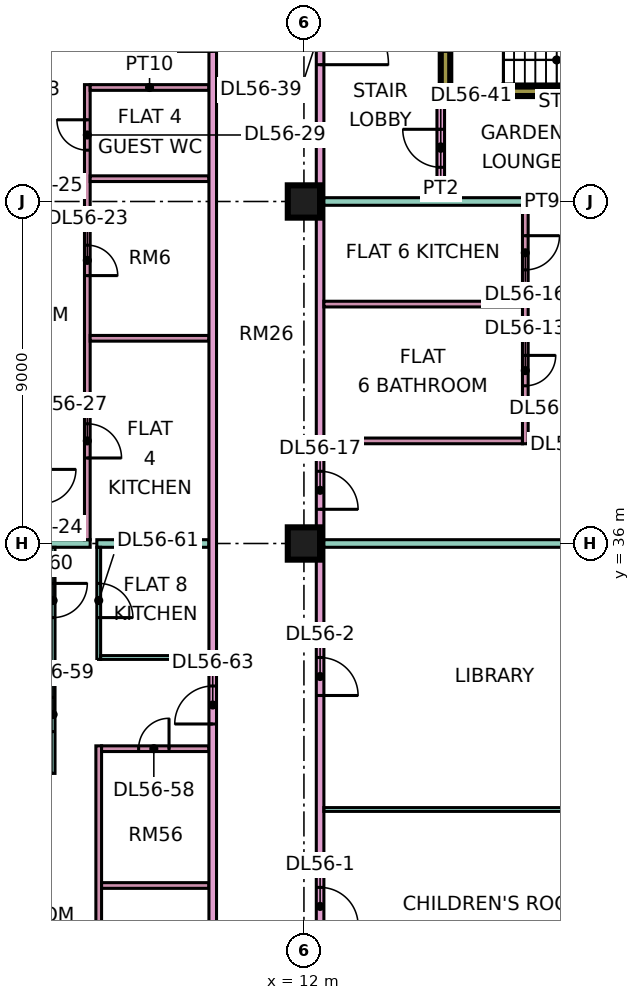
"""IFC4 building model, lengths in metres.
Left out: names, types, materials, properties, quantities, classifications, styles, units other than length and angle.
Written with IfcOpenShell. Run it as: python <this file> out.ifc"""

import sys

from ifc_helpers import new_model, si_unit, direction, frame, frame_2d, origin, origin_2d, place, context, subcontext, project, spatial, rectangle, extrude, element, fill, save


model = new_model("IFC4")
c1 = context("Model", 3, precision=1e-05, world=origin(), true_north=direction((0.0, 1.0)))
c2 = subcontext(c1, "Body", "Model", "MODEL_VIEW")
j1 = project(units=[si_unit("LENGTHUNIT", "METRE"), si_unit("PLANEANGLEUNIT", "RADIAN")], contexts=[c1])
p1 = place(None, origin())
s1 = spatial("IfcSite", under=j1, at=p1, CompositionType="ELEMENT")
p2 = place(p1, origin())
s2 = spatial("IfcBuilding", under=s1, at=p2, CompositionType="ELEMENT")
p3 = place(p2, frame((0.0, 0.0, 237.9)))
s3 = spatial("IfcBuildingStorey", under=s2, at=p3, CompositionType="ELEMENT", Elevation=237.9)
for number, where, z_axis, x_axis in (
    (1, (12.0, 36.0, 0.0), (0.0, 0.0, 1.0), (1.0, 0.0, 0.0)),
    (2, (12.0, 45.0, 0.0), (0.0, 0.0, 1.0), (1.0, 0.0, 0.0)),
):
    element("IfcColumn", number, at=place(p3, frame(where, z_axis=z_axis, x_axis=x_axis)), inside=s3, PredefinedType="COLUMN", context=c2, shape_type="SweptSolid", body=[
        extrude(rectangle(XDim=0.85, YDim=0.85, at=origin_2d()), origin(), (0.0, 0.0, 1.0), 3.75),
    ])
p4 = place(p3, frame((15.6, 47.9, 0.0), z_axis=(0.0, 0.0, 1.0), x_axis=(1.0, 0.0, 0.0)))
e3 = element("IfcWall", 3, at=p4, inside=s3, PredefinedType="SHEAR", context=c2, shape_type="SweptSolid", body=[
    extrude(rectangle(XDim=7.0, YDim=0.25, at=frame_2d((3.5, 0.0))), origin(), (0.0, 0.0, 1.0), 3.75),
])
p5 = place(p3, frame((15.725, 48.025, 0.0), z_axis=(0.0, 0.0, 1.0), x_axis=(0.0, 1.0, 0.0)))
e4 = element("IfcWall", 4, at=p5, inside=s3, PredefinedType="SHEAR", context=c2, shape_type="SweptSolid", body=[
    extrude(rectangle(XDim=2.95, YDim=0.25, at=frame_2d((1.475, 0.0))), origin(), (0.0, 0.0, 1.0), 3.75),
])
p6 = place(p5, frame((0.925, 0.0, 0.0)))
e5 = element("IfcOpeningElement", 5, at=p6, cuts=e4, PredefinedType="OPENING", context=c2, shape_type="SweptSolid", body=[
    extrude(rectangle(XDim=1.1, YDim=2.2, at=frame_2d((0.55, 1.1))), frame((0.0, 0.135, 0.0), z_axis=(0.0, -1.0, 0.0), x_axis=(1.0, 0.0, 0.0)), (0.0, 0.0, 1.0), 0.27),
])
p7 = place(p3, frame((0.0, 36.0, 0.0), z_axis=(0.0, 0.0, 1.0), x_axis=(1.0, 0.0, 0.0)))
e6 = element("IfcWall", 6, at=p7, inside=s3, PredefinedType="PARTITIONING", context=c2, shape_type="SweptSolid", body=[
    extrude(rectangle(XDim=6.375, YDim=0.2, at=frame_2d((3.188, 0.0))), origin(), (0.0, 0.0, 1.0), 3.35),
])
p8 = place(p3, frame((5.4, 29.95, 0.0), z_axis=(0.0, 0.0, 1.0), x_axis=(0.0, 1.0, 0.0)))
e7 = element("IfcWall", 7, at=p8, inside=s3, PredefinedType="PARTITIONING", context=c2, shape_type="SweptSolid", body=[
    extrude(rectangle(XDim=5.95, YDim=0.1, at=frame_2d((2.975, 0.0))), origin(), (0.0, 0.0, 1.0), 3.35),
])
p9 = place(p8, frame((1.1, 0.0, 0.0)))
e8 = element("IfcOpeningElement", 8, at=p9, cuts=e7, PredefinedType="OPENING", context=c2, shape_type="SweptSolid", body=[
    extrude(rectangle(XDim=0.9, YDim=2.1, at=frame_2d((0.45, 1.05))), frame((0.0, 0.06, 0.0), z_axis=(0.0, -1.0, 0.0), x_axis=(1.0, 0.0, 0.0)), (0.0, 0.0, 1.0), 0.12),
])
p10 = place(p8, frame((4.1, 0.0, 0.0)))
e9 = element("IfcOpeningElement", 9, at=p10, cuts=e7, PredefinedType="OPENING", context=c2, shape_type="SweptSolid", body=[
    extrude(rectangle(XDim=0.9, YDim=2.1, at=frame_2d((0.45, 1.05))), frame((0.0, 0.06, 0.0), z_axis=(0.0, -1.0, 0.0), x_axis=(1.0, 0.0, 0.0)), (0.0, 0.0, 1.0), 0.12),
])
p11 = place(p3, frame((6.3, 36.1, 0.0), z_axis=(0.0, 0.0, 1.0), x_axis=(0.0, 1.0, 0.0)))
e10 = element("IfcWall", 10, at=p11, inside=s3, PredefinedType="PARTITIONING", context=c2, shape_type="SweptSolid", body=[
    extrude(rectangle(XDim=11.975, YDim=0.15, at=frame_2d((5.987, 0.0))), origin(), (0.0, 0.0, 1.0), 3.35),
])
p12 = place(p11, frame((6.95, 0.0, 0.0)))
e11 = element("IfcOpeningElement", 11, at=p12, cuts=e10, PredefinedType="OPENING", context=c2, shape_type="SweptSolid", body=[
    extrude(rectangle(XDim=0.8, YDim=2.1, at=frame_2d((0.4, 1.05))), frame((0.0, 0.085, 0.0), z_axis=(0.0, -1.0, 0.0), x_axis=(1.0, 0.0, 0.0)), (0.0, 0.0, 1.0), 0.17),
])
p13 = place(p11, frame((2.15, 0.0, 0.0)))
e12 = element("IfcOpeningElement", 12, at=p13, cuts=e10, PredefinedType="OPENING", context=c2, shape_type="SweptSolid", body=[
    extrude(rectangle(XDim=0.9, YDim=2.1, at=frame_2d((0.45, 1.05))), frame((0.0, 0.085, 0.0), z_axis=(0.0, -1.0, 0.0), x_axis=(1.0, 0.0, 0.0)), (0.0, 0.0, 1.0), 0.17),
])
p14 = place(p11, frame((10.25, 0.0, 0.0)))
e13 = element("IfcOpeningElement", 13, at=p14, cuts=e10, PredefinedType="OPENING", context=c2, shape_type="SweptSolid", body=[
    extrude(rectangle(XDim=0.8, YDim=2.1, at=frame_2d((0.4, 1.05))), frame((0.0, 0.085, 0.0), z_axis=(0.0, -1.0, 0.0), x_axis=(1.0, 0.0, 0.0)), (0.0, 0.0, 1.0), 0.17),
])
for number, where, z_axis, x_axis in (
    (14, (6.375, 41.4, 0.0), (0.0, 0.0, 1.0), (1.0, 0.0, 0.0)),
    (15, (6.375, 45.6, 0.0), (0.0, 0.0, 1.0), (1.0, 0.0, 0.0)),
    (16, (6.375, 48.0, 0.0), (0.0, 0.0, 1.0), (1.0, 0.0, 0.0)),
):
    element("IfcWall", number, at=place(p3, frame(where, z_axis=z_axis, x_axis=x_axis)), inside=s3, PredefinedType="PARTITIONING", context=c2, shape_type="SweptSolid", body=[
        extrude(rectangle(XDim=3.125, YDim=0.15, at=frame_2d((1.562, 0.0))), origin(), (0.0, 0.0, 1.0), 3.35),
    ])
p15 = place(p3, frame((6.55, 36.0, 0.0), z_axis=(0.0, 0.0, 1.0), x_axis=(1.0, 0.0, 0.0)))
e17 = element("IfcWall", 17, at=p15, inside=s3, PredefinedType="PARTITIONING", context=c2, shape_type="SweptSolid", body=[
    extrude(rectangle(XDim=2.95, YDim=0.2, at=frame_2d((1.475, 0.0))), origin(), (0.0, 0.0, 1.0), 3.35),
])
p16 = place(p3, frame((6.6, 22.5, 0.0), z_axis=(0.0, 0.0, 1.0), x_axis=(0.0, 1.0, 0.0)))
e18 = element("IfcWall", 18, at=p16, inside=s3, PredefinedType="PARTITIONING", context=c2, shape_type="SweptSolid", body=[
    extrude(rectangle(XDim=8.175, YDim=0.15, at=frame_2d((4.087, 0.0))), origin(), (0.0, 0.0, 1.0), 3.35),
])
p17 = place(p16, frame((1.85, 0.0, 0.0)))
e19 = element("IfcOpeningElement", 19, at=p17, cuts=e18, PredefinedType="OPENING", context=c2, shape_type="SweptSolid", body=[
    extrude(rectangle(XDim=0.8, YDim=2.1, at=frame_2d((0.4, 1.05))), frame((0.0, 0.085, 0.0), z_axis=(0.0, -1.0, 0.0), x_axis=(1.0, 0.0, 0.0)), (0.0, 0.0, 1.0), 0.17),
])
p18 = place(p3, frame((6.6, 32.95, 0.0), z_axis=(0.0, 0.0, 1.0), x_axis=(0.0, 1.0, 0.0)))
e20 = element("IfcWall", 20, at=p18, inside=s3, PredefinedType="PARTITIONING", context=c2, shape_type="SweptSolid", body=[
    extrude(rectangle(XDim=2.95, YDim=0.1, at=frame_2d((1.475, 0.0))), origin(), (0.0, 0.0, 1.0), 3.35),
])
p19 = place(p18, frame((1.1, 0.0, 0.0)))
e21 = element("IfcOpeningElement", 21, at=p19, cuts=e20, PredefinedType="OPENING", context=c2, shape_type="SweptSolid", body=[
    extrude(rectangle(XDim=0.9, YDim=2.1, at=frame_2d((0.45, 1.05))), frame((0.0, 0.06, 0.0), z_axis=(0.0, -1.0, 0.0), x_axis=(1.0, 0.0, 0.0)), (0.0, 0.0, 1.0), 0.12),
])
p20 = place(p3, frame((6.65, 33.0, 0.0), z_axis=(0.0, 0.0, 1.0), x_axis=(1.0, 0.0, 0.0)))
e22 = element("IfcWall", 22, at=p20, inside=s3, PredefinedType="PARTITIONING", context=c2, shape_type="SweptSolid", body=[
    extrude(rectangle(XDim=2.85, YDim=0.1, at=frame_2d((1.425, 0.0))), origin(), (0.0, 0.0, 1.0), 3.35),
])
p21 = place(p3, frame((6.675, 27.0, 0.0), z_axis=(0.0, 0.0, 1.0), x_axis=(1.0, 0.0, 0.0)))
e23 = element("IfcWall", 23, at=p21, inside=s3, PredefinedType="PARTITIONING", context=c2, shape_type="SweptSolid", body=[
    extrude(rectangle(XDim=2.825, YDim=0.15, at=frame_2d((1.413, 0.0))), origin(), (0.0, 0.0, 1.0), 3.35),
])
p22 = place(p3, frame((6.675, 30.6, 0.0), z_axis=(0.0, 0.0, 1.0), x_axis=(1.0, 0.0, 0.0)))
e24 = element("IfcWall", 24, at=p22, inside=s3, PredefinedType="PARTITIONING", context=c2, shape_type="SweptSolid", body=[
    extrude(rectangle(XDim=2.825, YDim=0.15, at=frame_2d((1.413, 0.0))), origin(), (0.0, 0.0, 1.0), 3.35),
])
p23 = place(p22, frame((0.975, 0.0, 0.0)))
e25 = element("IfcOpeningElement", 25, at=p23, cuts=e24, PredefinedType="OPENING", context=c2, shape_type="SweptSolid", body=[
    extrude(rectangle(XDim=0.8, YDim=2.1, at=frame_2d((0.4, 1.05))), frame((0.0, 0.085, 0.0), z_axis=(0.0, -1.0, 0.0), x_axis=(1.0, 0.0, 0.0)), (0.0, 0.0, 1.0), 0.17),
])
p24 = place(p3, frame((9.6, 20.0, 0.0), z_axis=(0.0, 0.0, 1.0), x_axis=(0.0, 1.0, 0.0)))
e26 = element("IfcWall", 26, at=p24, inside=s3, PredefinedType="PARTITIONING", context=c2, shape_type="SweptSolid", body=[
    extrude(rectangle(XDim=42.926, YDim=0.2, at=frame_2d((21.463, 0.0))), origin(), (0.0, 0.0, 1.0), 3.35),
])
p25 = place(p24, frame((28.95, 0.0, 0.0)))
e27 = element("IfcOpeningElement", 27, at=p25, cuts=e26, PredefinedType="OPENING", context=c2, shape_type="SweptSolid", body=[
    extrude(rectangle(XDim=1.0, YDim=2.1, at=frame_2d((0.5, 1.05))), frame((0.0, 0.11, 0.0), z_axis=(0.0, -1.0, 0.0), x_axis=(1.0, 0.0, 0.0)), (0.0, 0.0, 1.0), 0.22),
])
p26 = place(p24, frame((31.95, 0.0, 0.0)))
e28 = element("IfcOpeningElement", 28, at=p26, cuts=e26, PredefinedType="OPENING", context=c2, shape_type="SweptSolid", body=[
    extrude(rectangle(XDim=1.0, YDim=2.1, at=frame_2d((0.5, 1.05))), frame((0.0, 0.11, 0.0), z_axis=(0.0, -1.0, 0.0), x_axis=(1.0, 0.0, 0.0)), (0.0, 0.0, 1.0), 0.22),
])
p27 = place(p24, frame((0.6, 0.0, 0.0)))
e29 = element("IfcOpeningElement", 29, at=p27, cuts=e26, PredefinedType="OPENING", context=c2, shape_type="SweptSolid", body=[
    extrude(rectangle(XDim=1.2, YDim=2.1, at=frame_2d((0.6, 1.05))), frame((0.0, 0.11, 0.0), z_axis=(0.0, -1.0, 0.0), x_axis=(1.0, 0.0, 0.0)), (0.0, 0.0, 1.0), 0.22),
])
p28 = place(p24, frame((11.25, 0.0, 0.0)))
e30 = element("IfcOpeningElement", 30, at=p28, cuts=e26, PredefinedType="OPENING", context=c2, shape_type="SweptSolid", body=[
    extrude(rectangle(XDim=1.0, YDim=2.1, at=frame_2d((0.5, 1.05))), frame((0.0, 0.11, 0.0), z_axis=(0.0, -1.0, 0.0), x_axis=(1.0, 0.0, 0.0)), (0.0, 0.0, 1.0), 0.22),
])
p29 = place(p3, frame((12.425, 20.0, 0.0), z_axis=(0.0, 0.0, 1.0), x_axis=(0.0, 1.0, 0.0)))
e31 = element("IfcWall", 31, at=p29, inside=s3, PredefinedType="PARTITIONING", context=c2, shape_type="SweptSolid", body=[
    extrude(rectangle(XDim=43.0, YDim=0.2, at=frame_2d((21.5, 0.0))), origin(), (0.0, 0.0, 1.0), 3.35),
])
p30 = place(p29, frame((5.95, 0.0, 0.0)))
e32 = element("IfcOpeningElement", 32, at=p30, cuts=e31, PredefinedType="OPENING", context=c2, shape_type="SweptSolid", body=[
    extrude(rectangle(XDim=1.0, YDim=2.1, at=frame_2d((0.5, 1.05))), frame((0.0, 0.11, 0.0), z_axis=(0.0, -1.0, 0.0), x_axis=(1.0, 0.0, 0.0)), (0.0, 0.0, 1.0), 0.22),
])
p31 = place(p29, frame((12.0, 0.0, 0.0)))
e33 = element("IfcOpeningElement", 33, at=p31, cuts=e31, PredefinedType="OPENING", context=c2, shape_type="SweptSolid", body=[
    extrude(rectangle(XDim=1.0, YDim=2.1, at=frame_2d((0.5, 1.05))), frame((0.0, 0.11, 0.0), z_axis=(0.0, -1.0, 0.0), x_axis=(1.0, 0.0, 0.0)), (0.0, 0.0, 1.0), 0.22),
])
p32 = place(p29, frame((16.9, 0.0, 0.0)))
e34 = element("IfcOpeningElement", 34, at=p32, cuts=e31, PredefinedType="OPENING", context=c2, shape_type="SweptSolid", body=[
    extrude(rectangle(XDim=1.0, YDim=2.1, at=frame_2d((0.5, 1.05))), frame((0.0, 0.11, 0.0), z_axis=(0.0, -1.0, 0.0), x_axis=(1.0, 0.0, 0.0)), (0.0, 0.0, 1.0), 0.22),
])
p33 = place(p29, frame((41.05, 0.0, 0.0)))
e35 = element("IfcOpeningElement", 35, at=p33, cuts=e31, PredefinedType="OPENING", context=c2, shape_type="SweptSolid", body=[
    extrude(rectangle(XDim=1.0, YDim=2.1, at=frame_2d((0.5, 1.05))), frame((0.0, 0.11, 0.0), z_axis=(0.0, -1.0, 0.0), x_axis=(1.0, 0.0, 0.0)), (0.0, 0.0, 1.0), 0.22),
])
p34 = place(p29, frame((1.15, 0.0, 0.0)))
e36 = element("IfcOpeningElement", 36, at=p34, cuts=e31, PredefinedType="OPENING", context=c2, shape_type="SweptSolid", body=[
    extrude(rectangle(XDim=1.8, YDim=2.1, at=frame_2d((0.9, 1.05))), frame((0.0, 0.11, 0.0), z_axis=(0.0, -1.0, 0.0), x_axis=(1.0, 0.0, 0.0)), (0.0, 0.0, 1.0), 0.22),
])
p35 = place(p29, frame((28.6, 0.0, 0.0)))
e37 = element("IfcOpeningElement", 37, at=p35, cuts=e31, PredefinedType="OPENING", context=c2, shape_type="SweptSolid", body=[
    extrude(rectangle(XDim=1.8, YDim=2.1, at=frame_2d((0.9, 1.05))), frame((0.0, 0.11, 0.0), z_axis=(0.0, -1.0, 0.0), x_axis=(1.0, 0.0, 0.0)), (0.0, 0.0, 1.0), 0.22),
])
p36 = place(p3, frame((12.525, 29.0, 0.0), z_axis=(0.0, 0.0, 1.0), x_axis=(1.0, 0.0, 0.0)))
e38 = element("IfcWall", 38, at=p36, inside=s3, PredefinedType="PARTITIONING", context=c2, shape_type="SweptSolid", body=[
    extrude(rectangle(XDim=8.975, YDim=0.1, at=frame_2d((4.488, 0.0))), origin(), (0.0, 0.0, 1.0), 3.35),
])
p37 = place(p3, frame((12.525, 36.0, 0.0), z_axis=(0.0, 0.0, 1.0), x_axis=(1.0, 0.0, 0.0)))
e39 = element("IfcWall", 39, at=p37, inside=s3, PredefinedType="PARTITIONING", context=c2, shape_type="SweptSolid", body=[
    extrude(rectangle(XDim=11.475, YDim=0.2, at=frame_2d((5.738, 0.0))), origin(), (0.0, 0.0, 1.0), 3.35),
])
for number, where, z_axis, x_axis in (
    (40, (12.525, 38.7, 0.0), (0.0, 0.0, 1.0), (1.0, 0.0, 0.0)),
    (41, (12.525, 42.3, 0.0), (0.0, 0.0, 1.0), (1.0, 0.0, 0.0)),
):
    element("IfcWall", number, at=place(p3, frame(where, z_axis=z_axis, x_axis=x_axis)), inside=s3, PredefinedType="PARTITIONING", context=c2, shape_type="SweptSolid", body=[
        extrude(rectangle(XDim=5.225, YDim=0.15, at=frame_2d((2.613, 0.0))), origin(), (0.0, 0.0, 1.0), 3.35),
    ])
p38 = place(p3, frame((12.525, 45.0, 0.0), z_axis=(0.0, 0.0, 1.0), x_axis=(1.0, 0.0, 0.0)))
e42 = element("IfcWall", 42, at=p38, inside=s3, PredefinedType="PARTITIONING", context=c2, shape_type="SweptSolid", body=[
    extrude(rectangle(XDim=11.475, YDim=0.2, at=frame_2d((5.738, 0.0))), origin(), (0.0, 0.0, 1.0), 3.35),
])
p39 = place(p3, frame((15.6, 45.1, 0.0), z_axis=(0.0, 0.0, 1.0), x_axis=(0.0, 1.0, 0.0)))
e43 = element("IfcWall", 43, at=p39, inside=s3, PredefinedType="PARTITIONING", context=c2, shape_type="SweptSolid", body=[
    extrude(rectangle(XDim=2.675, YDim=0.2, at=frame_2d((1.337, 0.0))), origin(), (0.0, 0.0, 1.0), 3.35),
])
p40 = place(p39, frame((0.8, 0.0, 0.0)))
e44 = element("IfcOpeningElement", 44, at=p40, cuts=e43, PredefinedType="OPENING", context=c2, shape_type="SweptSolid", body=[
    extrude(rectangle(XDim=1.0, YDim=2.1, at=frame_2d((0.5, 1.05))), frame((0.0, 0.11, 0.0), z_axis=(0.0, -1.0, 0.0), x_axis=(1.0, 0.0, 0.0)), (0.0, 0.0, 1.0), 0.22),
])
p41 = place(p3, frame((17.825, 38.625, 0.0), z_axis=(0.0, 0.0, 1.0), x_axis=(0.0, 1.0, 0.0)))
e45 = element("IfcWall", 45, at=p41, inside=s3, PredefinedType="PARTITIONING", context=c2, shape_type="SweptSolid", body=[
    extrude(rectangle(XDim=6.275, YDim=0.15, at=frame_2d((3.137, 0.0))), origin(), (0.0, 0.0, 1.0), 3.35),
])
p42 = place(p41, frame((1.525, 0.0, 0.0)))
e46 = element("IfcOpeningElement", 46, at=p42, cuts=e45, PredefinedType="OPENING", context=c2, shape_type="SweptSolid", body=[
    extrude(rectangle(XDim=0.8, YDim=2.1, at=frame_2d((0.4, 1.05))), frame((0.0, 0.085, 0.0), z_axis=(0.0, -1.0, 0.0), x_axis=(1.0, 0.0, 0.0)), (0.0, 0.0, 1.0), 0.17),
])
p43 = place(p41, frame((4.575, 0.0, 0.0)))
e47 = element("IfcOpeningElement", 47, at=p43, cuts=e45, PredefinedType="OPENING", context=c2, shape_type="SweptSolid", body=[
    extrude(rectangle(XDim=0.9, YDim=2.1, at=frame_2d((0.45, 1.05))), frame((0.0, 0.085, 0.0), z_axis=(0.0, -1.0, 0.0), x_axis=(1.0, 0.0, 0.0)), (0.0, 0.0, 1.0), 0.17),
])
p44 = place(p30, frame((1.0, 0.0, 0.0), z_axis=(0.0, 0.0, 1.0), x_axis=(-1.0, 0.0, 0.0)))
e48 = element("IfcDoor", 48, at=p44, inside=s3, OperationType="SINGLE_SWING_LEFT", PredefinedType="DOOR", context=c2, shape_type="SweptSolid", body=[
    extrude(rectangle(XDim=1.0, YDim=2.1, at=frame_2d((0.5, 1.05))), frame((0.0, 0.025, 0.0), z_axis=(0.0, -1.0, 0.0), x_axis=(1.0, 0.0, 0.0)), (0.0, 0.0, 1.0), 0.05),
])
fill(e32, e48)
p45 = place(p31, frame((1.0, 0.0, 0.0), z_axis=(0.0, 0.0, 1.0), x_axis=(-1.0, 0.0, 0.0)))
e49 = element("IfcDoor", 49, at=p45, inside=s3, OperationType="SINGLE_SWING_LEFT", PredefinedType="DOOR", context=c2, shape_type="SweptSolid", body=[
    extrude(rectangle(XDim=1.0, YDim=2.1, at=frame_2d((0.5, 1.05))), frame((0.0, 0.025, 0.0), z_axis=(0.0, -1.0, 0.0), x_axis=(1.0, 0.0, 0.0)), (0.0, 0.0, 1.0), 0.05),
])
fill(e33, e49)
p46 = place(p42, origin())
e50 = element("IfcDoor", 50, at=p46, inside=s3, OperationType="SINGLE_SWING_RIGHT", PredefinedType="DOOR", context=c2, shape_type="SweptSolid", body=[
    extrude(rectangle(XDim=0.8, YDim=2.1, at=frame_2d((0.4, 1.05))), frame((0.0, 0.025, 0.0), z_axis=(0.0, -1.0, 0.0), x_axis=(1.0, 0.0, 0.0)), (0.0, 0.0, 1.0), 0.05),
])
fill(e46, e50)
p47 = place(p43, origin())
e51 = element("IfcDoor", 51, at=p47, inside=s3, OperationType="SINGLE_SWING_RIGHT", PredefinedType="DOOR", context=c2, shape_type="SweptSolid", body=[
    extrude(rectangle(XDim=0.9, YDim=2.1, at=frame_2d((0.45, 1.05))), frame((0.0, 0.025, 0.0), z_axis=(0.0, -1.0, 0.0), x_axis=(1.0, 0.0, 0.0)), (0.0, 0.0, 1.0), 0.05),
])
fill(e47, e51)
p48 = place(p32, frame((1.0, 0.0, 0.0), z_axis=(0.0, 0.0, 1.0), x_axis=(-1.0, 0.0, 0.0)))
e52 = element("IfcDoor", 52, at=p48, inside=s3, OperationType="SINGLE_SWING_LEFT", PredefinedType="DOOR", context=c2, shape_type="SweptSolid", body=[
    extrude(rectangle(XDim=1.0, YDim=2.1, at=frame_2d((0.5, 1.05))), frame((0.0, 0.025, 0.0), z_axis=(0.0, -1.0, 0.0), x_axis=(1.0, 0.0, 0.0)), (0.0, 0.0, 1.0), 0.05),
])
fill(e34, e52)
p49 = place(p12, frame((0.8, 0.0, 0.0), z_axis=(0.0, 0.0, 1.0), x_axis=(-1.0, 0.0, 0.0)))
e53 = element("IfcDoor", 53, at=p49, inside=s3, OperationType="SINGLE_SWING_LEFT", PredefinedType="DOOR", context=c2, shape_type="SweptSolid", body=[
    extrude(rectangle(XDim=0.8, YDim=2.1, at=frame_2d((0.4, 1.05))), frame((0.0, 0.025, 0.0), z_axis=(0.0, -1.0, 0.0), x_axis=(1.0, 0.0, 0.0)), (0.0, 0.0, 1.0), 0.05),
])
fill(e11, e53)
p50 = place(p13, frame((0.9, 0.0, 0.0), z_axis=(0.0, 0.0, 1.0), x_axis=(-1.0, 0.0, 0.0)))
e54 = element("IfcDoor", 54, at=p50, inside=s3, OperationType="SINGLE_SWING_LEFT", PredefinedType="DOOR", context=c2, shape_type="SweptSolid", body=[
    extrude(rectangle(XDim=0.9, YDim=2.1, at=frame_2d((0.45, 1.05))), frame((0.0, 0.025, 0.0), z_axis=(0.0, -1.0, 0.0), x_axis=(1.0, 0.0, 0.0)), (0.0, 0.0, 1.0), 0.05),
])
fill(e12, e54)
p51 = place(p14, frame((0.8, 0.0, 0.0), z_axis=(0.0, 0.0, 1.0), x_axis=(-1.0, 0.0, 0.0)))
e55 = element("IfcDoor", 55, at=p51, inside=s3, OperationType="SINGLE_SWING_RIGHT", PredefinedType="DOOR", context=c2, shape_type="SweptSolid", body=[
    extrude(rectangle(XDim=0.8, YDim=2.1, at=frame_2d((0.4, 1.05))), frame((0.0, 0.025, 0.0), z_axis=(0.0, -1.0, 0.0), x_axis=(1.0, 0.0, 0.0)), (0.0, 0.0, 1.0), 0.05),
])
fill(e13, e55)
p52 = place(p35, frame((1.8, 0.0, 0.0), z_axis=(0.0, 0.0, 1.0), x_axis=(-1.0, 0.0, 0.0)))
e56 = element("IfcDoor", 56, at=p52, inside=s3, OperationType="DOUBLE_DOOR_SINGLE_SWING", PredefinedType="DOOR", context=c2, shape_type="SweptSolid", body=[
    extrude(rectangle(XDim=1.8, YDim=2.1, at=frame_2d((0.9, 1.05))), frame((0.0, 0.025, 0.0), z_axis=(0.0, -1.0, 0.0), x_axis=(1.0, 0.0, 0.0)), (0.0, 0.0, 1.0), 0.05),
])
fill(e37, e56)
p53 = place(p40, frame((1.0, 0.0, 0.0), z_axis=(0.0, 0.0, 1.0), x_axis=(-1.0, 0.0, 0.0)))
e57 = element("IfcDoor", 57, at=p53, inside=s3, OperationType="SINGLE_SWING_RIGHT", PredefinedType="DOOR", context=c2, shape_type="SweptSolid", body=[
    extrude(rectangle(XDim=1.0, YDim=2.1, at=frame_2d((0.5, 1.05))), frame((0.0, 0.025, 0.0), z_axis=(0.0, -1.0, 0.0), x_axis=(1.0, 0.0, 0.0)), (0.0, 0.0, 1.0), 0.05),
])
fill(e44, e57)
p54 = place(p23, frame((0.8, 0.0, 0.0), z_axis=(0.0, 0.0, 1.0), x_axis=(-1.0, 0.0, 0.0)))
e58 = element("IfcDoor", 58, at=p54, inside=s3, OperationType="SINGLE_SWING_RIGHT", PredefinedType="DOOR", context=c2, shape_type="SweptSolid", body=[
    extrude(rectangle(XDim=0.8, YDim=2.1, at=frame_2d((0.4, 1.05))), frame((0.0, 0.025, 0.0), z_axis=(0.0, -1.0, 0.0), x_axis=(1.0, 0.0, 0.0)), (0.0, 0.0, 1.0), 0.05),
])
fill(e25, e58)
p55 = place(p9, origin())
e59 = element("IfcDoor", 59, at=p55, inside=s3, OperationType="SINGLE_SWING_LEFT", PredefinedType="DOOR", context=c2, shape_type="SweptSolid", body=[
    extrude(rectangle(XDim=0.9, YDim=2.1, at=frame_2d((0.45, 1.05))), frame((0.0, 0.025, 0.0), z_axis=(0.0, -1.0, 0.0), x_axis=(1.0, 0.0, 0.0)), (0.0, 0.0, 1.0), 0.05),
])
fill(e8, e59)
p56 = place(p10, origin())
e60 = element("IfcDoor", 60, at=p56, inside=s3, OperationType="SINGLE_SWING_RIGHT", PredefinedType="DOOR", context=c2, shape_type="SweptSolid", body=[
    extrude(rectangle(XDim=0.9, YDim=2.1, at=frame_2d((0.45, 1.05))), frame((0.0, 0.025, 0.0), z_axis=(0.0, -1.0, 0.0), x_axis=(1.0, 0.0, 0.0)), (0.0, 0.0, 1.0), 0.05),
])
fill(e9, e60)
p57 = place(p19, frame((0.9, 0.0, 0.0), z_axis=(0.0, 0.0, 1.0), x_axis=(-1.0, 0.0, 0.0)))
e61 = element("IfcDoor", 61, at=p57, inside=s3, OperationType="SINGLE_SWING_LEFT", PredefinedType="DOOR", context=c2, shape_type="SweptSolid", body=[
    extrude(rectangle(XDim=0.9, YDim=2.1, at=frame_2d((0.45, 1.05))), frame((0.0, 0.025, 0.0), z_axis=(0.0, -1.0, 0.0), x_axis=(1.0, 0.0, 0.0)), (0.0, 0.0, 1.0), 0.05),
])
fill(e21, e61)
p58 = place(p28, origin())
e62 = element("IfcDoor", 62, at=p58, inside=s3, OperationType="SINGLE_SWING_LEFT", PredefinedType="DOOR", context=c2, shape_type="SweptSolid", body=[
    extrude(rectangle(XDim=1.0, YDim=2.1, at=frame_2d((0.5, 1.05))), frame((0.0, 0.025, 0.0), z_axis=(0.0, -1.0, 0.0), x_axis=(1.0, 0.0, 0.0)), (0.0, 0.0, 1.0), 0.05),
])
fill(e30, e62)
save(model, sys.argv[1])
